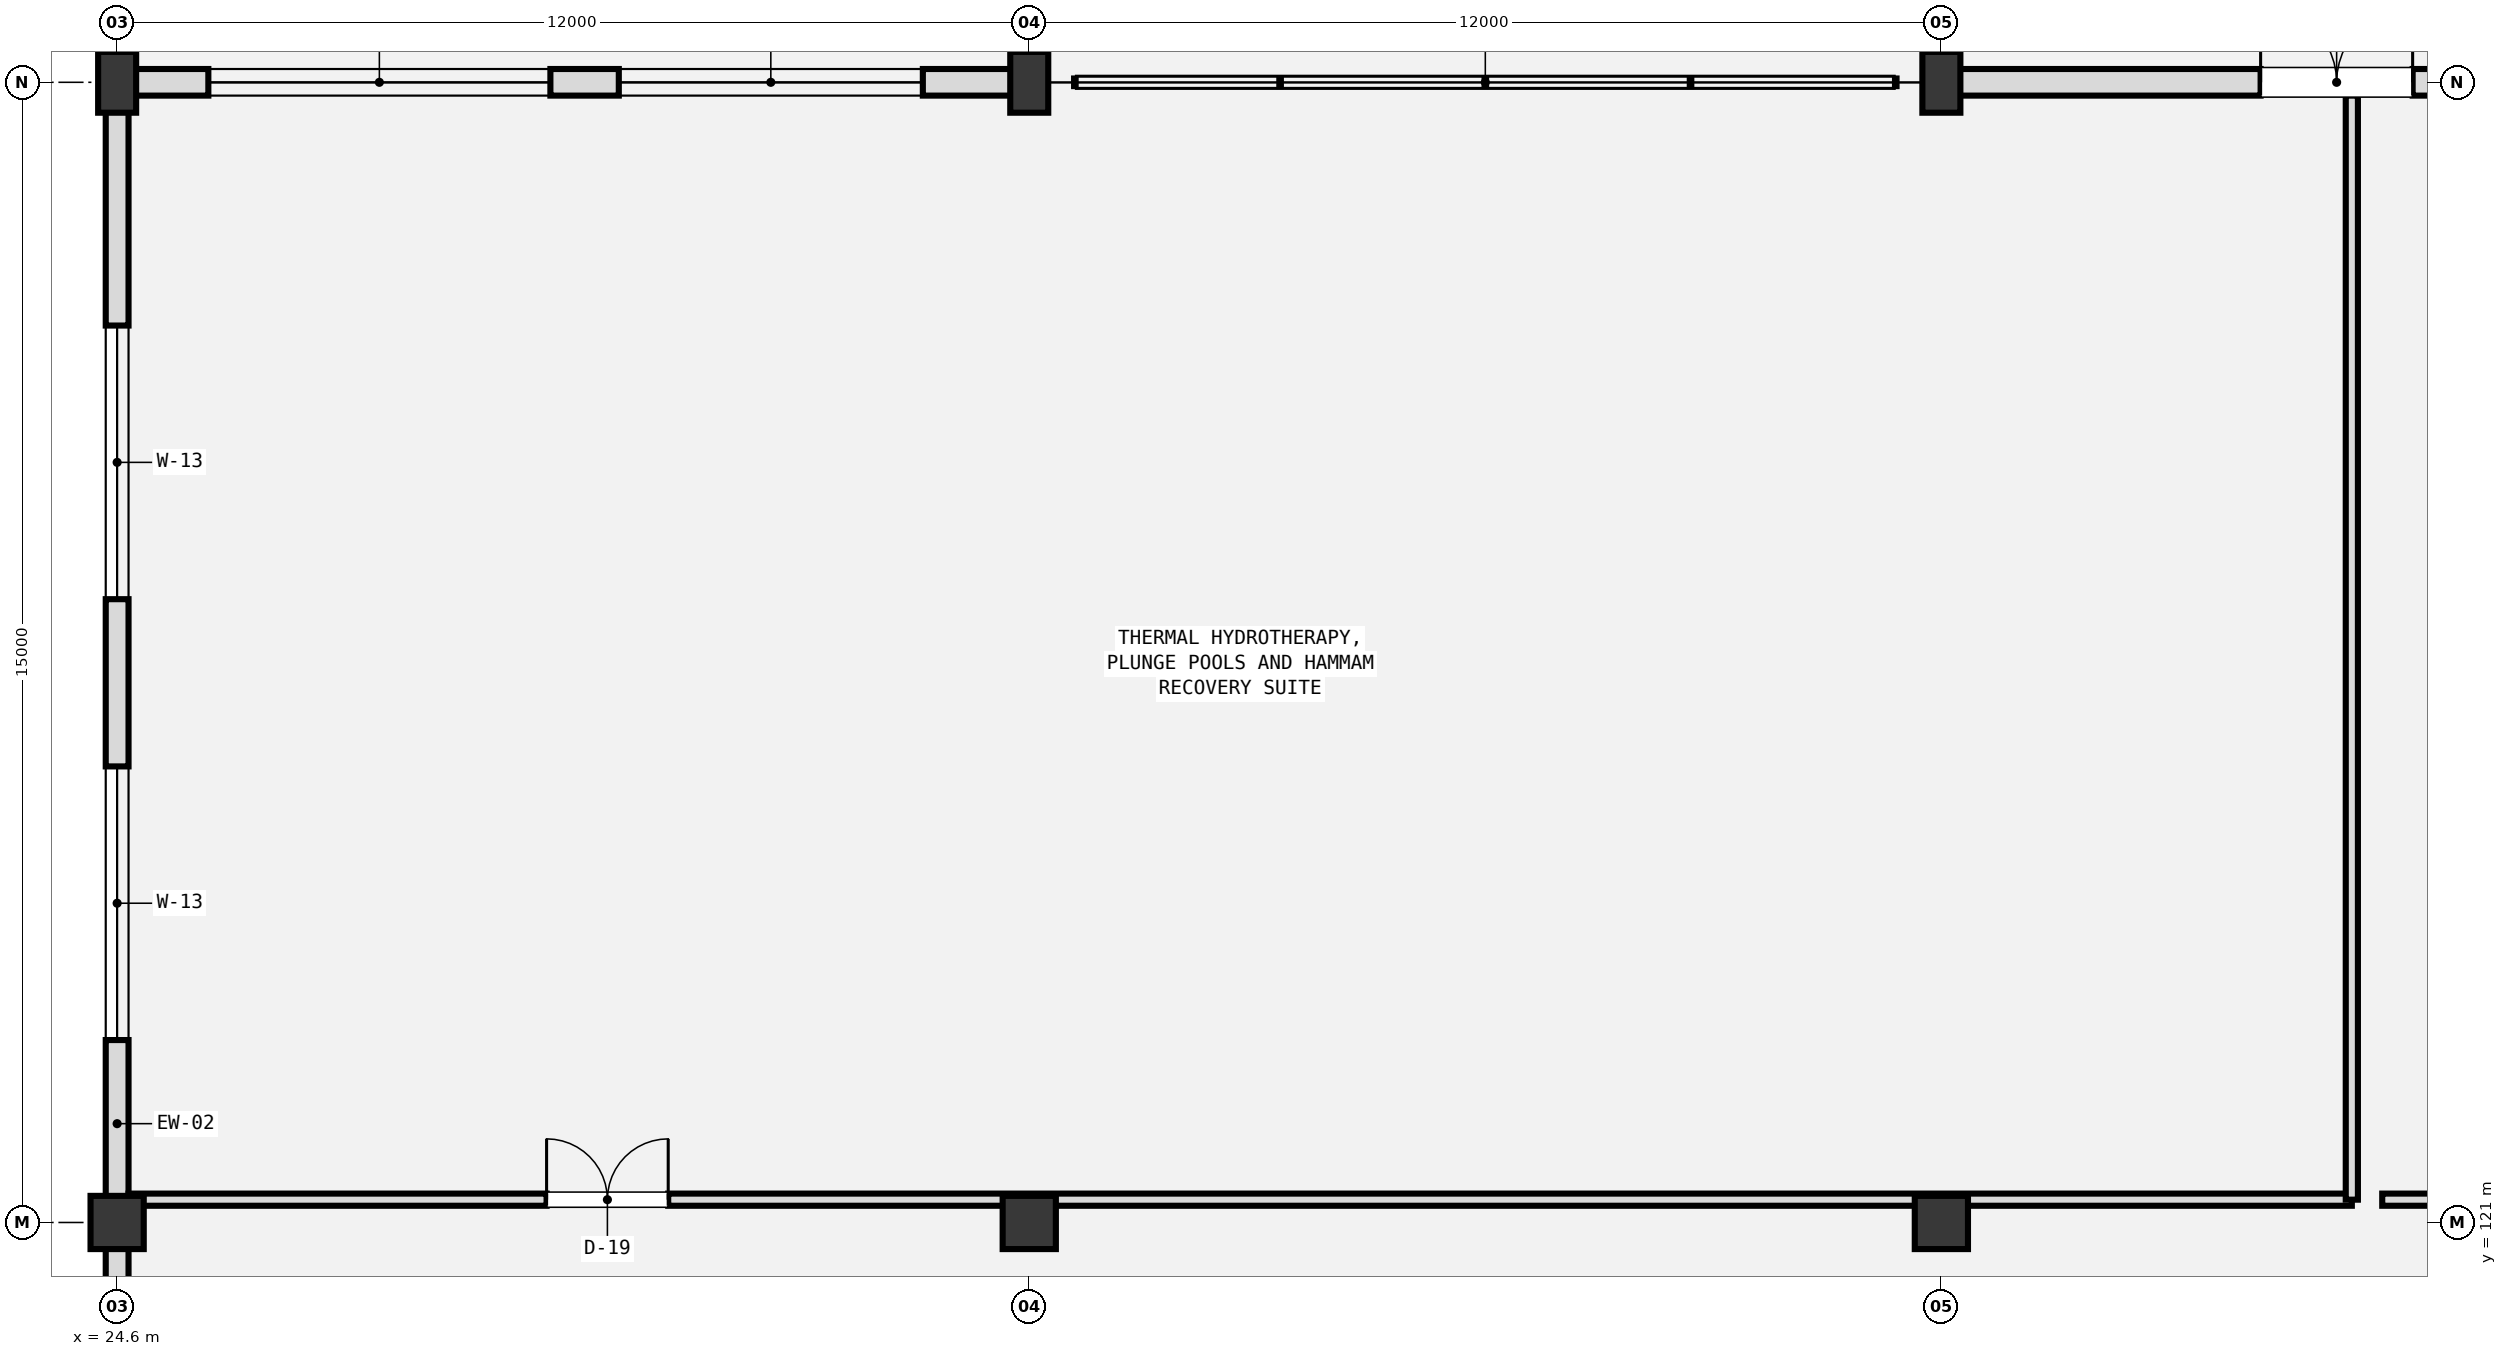
"""IFC4 building model, lengths in metres.
Left out: names, types, materials, properties, quantities, classifications, styles, units other than length and angle.
Written with IfcOpenShell. Run it as: python <this file> out.ifc"""

import sys

from ifc_helpers import new_model, si_unit, direction, frame, frame_2d, origin, origin_2d, place, context, subcontext, project, spatial, rectangle, extrude, element, fill, save


model = new_model("IFC4")
c1 = context("Model", 3, precision=1e-05, world=origin(), true_north=direction((0.0, 1.0)))
c2 = subcontext(c1, "Body", "Model", "MODEL_VIEW")
j1 = project(units=[si_unit("LENGTHUNIT", "METRE"), si_unit("PLANEANGLEUNIT", "RADIAN")], contexts=[c1])
p1 = place(None, origin())
s1 = spatial("IfcSite", under=j1, at=p1, CompositionType="ELEMENT")
p2 = place(p1, origin())
s2 = spatial("IfcBuilding", under=s1, at=p2, CompositionType="ELEMENT")
p3 = place(p2, origin())
s3 = spatial("IfcBuildingStorey", under=s2, at=p3, CompositionType="ELEMENT", Elevation=0.0)
p4 = place(p3, frame((24.6, 121.0, 0.0), z_axis=(0.0, 0.0, 1.0), x_axis=(1.0, 0.0, 0.0)))
e1 = element("IfcColumn", 1, at=p4, inside=s3, PredefinedType="COLUMN", context=c2, shape_type="SweptSolid", body=[
    extrude(rectangle(XDim=0.7, YDim=0.7, at=origin_2d()), origin(), (0.0, 0.0, 1.0), 5.4),
])
p5 = place(p3, frame((24.6, 136.0, 0.0), z_axis=(0.0, 0.0, 1.0), x_axis=(1.0, 0.0, 0.0)))
e2 = element("IfcColumn", 2, at=p5, inside=s3, PredefinedType="COLUMN", context=c2, shape_type="SweptSolid", body=[
    extrude(rectangle(XDim=0.5, YDim=0.8, at=origin_2d()), origin(), (0.0, 0.0, 1.0), 5.4),
])
p6 = place(p3, frame((36.6, 121.0, 0.0), z_axis=(0.0, 0.0, 1.0), x_axis=(1.0, 0.0, 0.0)))
e3 = element("IfcColumn", 3, at=p6, inside=s3, PredefinedType="COLUMN", context=c2, shape_type="SweptSolid", body=[
    extrude(rectangle(XDim=0.7, YDim=0.7, at=origin_2d()), origin(), (0.0, 0.0, 1.0), 5.4),
])
p7 = place(p3, frame((36.6, 136.0, 0.0), z_axis=(0.0, 0.0, 1.0), x_axis=(1.0, 0.0, 0.0)))
e4 = element("IfcColumn", 4, at=p7, inside=s3, PredefinedType="COLUMN", context=c2, shape_type="SweptSolid", body=[
    extrude(rectangle(XDim=0.5, YDim=0.8, at=origin_2d()), origin(), (0.0, 0.0, 1.0), 5.4),
])
p8 = place(p3, frame((48.6, 121.0, 0.0), z_axis=(0.0, 0.0, 1.0), x_axis=(1.0, 0.0, 0.0)))
e5 = element("IfcColumn", 5, at=p8, inside=s3, PredefinedType="COLUMN", context=c2, shape_type="SweptSolid", body=[
    extrude(rectangle(XDim=0.7, YDim=0.7, at=origin_2d()), origin(), (0.0, 0.0, 1.0), 5.4),
])
p9 = place(p3, frame((48.6, 136.0, 0.0), z_axis=(0.0, 0.0, 1.0), x_axis=(1.0, 0.0, 0.0)))
e6 = element("IfcColumn", 6, at=p9, inside=s3, PredefinedType="COLUMN", context=c2, shape_type="SweptSolid", body=[
    extrude(rectangle(XDim=0.5, YDim=0.8, at=origin_2d()), origin(), (0.0, 0.0, 1.0), 5.4),
])
p10 = place(p3, frame((24.6, 136.0, 0.0), z_axis=(0.0, 0.0, 1.0), x_axis=(1.0, 0.0, 0.0)))
e7 = element("IfcWall", 7, at=p10, inside=s3, PredefinedType="SOLIDWALL", context=c2, shape_type="SweptSolid", body=[
    extrude(rectangle(XDim=12.0, YDim=0.35, at=frame_2d((6.0, 0.0))), origin(), (0.0, 0.0, 1.0), 4.53),
])
p11 = place(p10, frame((1.2, 0.0, 0.95)))
e8 = element("IfcOpeningElement", 8, at=p11, cuts=e7, PredefinedType="OPENING", context=c2, shape_type="SweptSolid", body=[
    extrude(rectangle(XDim=4.5, YDim=1.2, at=frame_2d((2.25, 0.6))), frame((0.0, 0.185, 0.0), z_axis=(0.0, -1.0, 0.0), x_axis=(1.0, 0.0, 0.0)), (0.0, 0.0, 1.0), 0.37),
])
p12 = place(p10, frame((6.6, 0.0, 0.95)))
e9 = element("IfcOpeningElement", 9, at=p12, cuts=e7, PredefinedType="OPENING", context=c2, shape_type="SweptSolid", body=[
    extrude(rectangle(XDim=4.0, YDim=1.2, at=frame_2d((2.0, 0.6))), frame((0.0, 0.185, 0.0), z_axis=(0.0, -1.0, 0.0), x_axis=(1.0, 0.0, 0.0)), (0.0, 0.0, 1.0), 0.37),
])
p13 = place(p3, frame((48.6, 136.0, 0.0), z_axis=(0.0, 0.0, 1.0), x_axis=(1.0, 0.0, 0.0)))
e10 = element("IfcWall", 10, at=p13, inside=s3, PredefinedType="SOLIDWALL", context=c2, shape_type="SweptSolid", body=[
    extrude(rectangle(XDim=12.0, YDim=0.35, at=frame_2d((6.0, 0.0))), origin(), (0.0, 0.0, 1.0), 4.79),
])
p14 = place(p13, frame((4.2, 0.0, 0.0)))
e11 = element("IfcOpeningElement", 11, at=p14, cuts=e10, PredefinedType="OPENING", context=c2, shape_type="SweptSolid", body=[
    extrude(rectangle(XDim=2.0, YDim=2.4, at=frame_2d((1.0, 1.2))), frame((0.0, 0.185, 0.0), z_axis=(0.0, -1.0, 0.0), x_axis=(1.0, 0.0, 0.0)), (0.0, 0.0, 1.0), 0.37),
])
p15 = place(p13, frame((6.65, 0.0, 0.95)))
e12 = element("IfcOpeningElement", 12, at=p15, cuts=e10, PredefinedType="OPENING", context=c2, shape_type="SweptSolid", body=[
    extrude(rectangle(XDim=3.6, YDim=1.2, at=frame_2d((1.8, 0.6))), frame((0.0, 0.185, 0.0), z_axis=(0.0, -1.0, 0.0), x_axis=(1.0, 0.0, 0.0)), (0.0, 0.0, 1.0), 0.37),
])
p16 = place(p3, frame((24.6, 108.6, 0.0), z_axis=(0.0, 0.0, 1.0), x_axis=(0.0, 1.0, 0.0)))
e13 = element("IfcWall", 13, at=p16, inside=s3, PredefinedType="SOLIDWALL", context=c2, shape_type="SweptSolid", body=[
    extrude(rectangle(XDim=27.4, YDim=0.3, at=frame_2d((13.7, 0.0))), origin(), (0.0, 0.0, 1.0), 4.48),
])
p17 = place(p16, frame((3.1, 0.0, 0.9)))
e14 = element("IfcOpeningElement", 14, at=p17, cuts=e13, PredefinedType="OPENING", context=c2, shape_type="SweptSolid", body=[
    extrude(rectangle(XDim=3.2, YDim=1.5, at=frame_2d((1.6, 0.75))), frame((0.0, 0.16, 0.0), z_axis=(0.0, -1.0, 0.0), x_axis=(1.0, 0.0, 0.0)), (0.0, 0.0, 1.0), 0.32),
])
p18 = place(p16, frame((14.8, 0.0, 0.9)))
e15 = element("IfcOpeningElement", 15, at=p18, cuts=e13, PredefinedType="OPENING", context=c2, shape_type="SweptSolid", body=[
    extrude(rectangle(XDim=3.6, YDim=1.5, at=frame_2d((1.8, 0.75))), frame((0.0, 0.16, 0.0), z_axis=(0.0, -1.0, 0.0), x_axis=(1.0, 0.0, 0.0)), (0.0, 0.0, 1.0), 0.32),
])
p19 = place(p16, frame((20.6, 0.0, 0.9)))
e16 = element("IfcOpeningElement", 16, at=p19, cuts=e13, PredefinedType="OPENING", context=c2, shape_type="SweptSolid", body=[
    extrude(rectangle(XDim=3.6, YDim=1.5, at=frame_2d((1.8, 0.75))), frame((0.0, 0.16, 0.0), z_axis=(0.0, -1.0, 0.0), x_axis=(1.0, 0.0, 0.0)), (0.0, 0.0, 1.0), 0.32),
])
p20 = place(p3, frame((24.75, 121.3, 0.0), z_axis=(0.0, 0.0, 1.0), x_axis=(1.0, 0.0, 0.0)))
e17 = element("IfcWall", 17, at=p20, inside=s3, PredefinedType="PLUMBINGWALL", context=c2, shape_type="SweptSolid", body=[
    extrude(rectangle(XDim=29.25, YDim=0.16, at=frame_2d((14.625, 0.0))), origin(), (0.0, 0.0, 1.0), 3.9),
])
p21 = place(p20, frame((5.5, 0.0, 0.0)))
e18 = element("IfcOpeningElement", 18, at=p21, cuts=e17, PredefinedType="OPENING", context=c2, shape_type="SweptSolid", body=[
    extrude(rectangle(XDim=1.6, YDim=2.2, at=frame_2d((0.8, 1.1))), frame((0.0, 0.09, 0.0), z_axis=(0.0, -1.0, 0.0), x_axis=(1.0, 0.0, 0.0)), (0.0, 0.0, 1.0), 0.18),
])
p22 = place(p3, frame((54.0, 121.3, 0.0), z_axis=(0.0, 0.0, 1.0), x_axis=(0.0, 1.0, 0.0)))
e19 = element("IfcWall", 19, at=p22, inside=s3, PredefinedType="PLUMBINGWALL", context=c2, shape_type="SweptSolid", body=[
    extrude(rectangle(XDim=14.525, YDim=0.16, at=frame_2d((7.262, 0.0))), origin(), (0.0, 0.0, 1.0), 3.9),
])
p23 = place(p3, frame((54.4, 121.3, 0.0), z_axis=(0.0, 0.0, 1.0), x_axis=(1.0, 0.0, 0.0)))
e20 = element("IfcWall", 20, at=p23, inside=s3, PredefinedType="PLUMBINGWALL", context=c2, shape_type="SweptSolid", body=[
    extrude(rectangle(XDim=27.6, YDim=0.16, at=frame_2d((13.8, 0.0))), origin(), (0.0, 0.0, 1.0), 3.9),
])
p24 = place(p23, frame((10.0, 0.0, 0.0)))
e21 = element("IfcOpeningElement", 21, at=p24, cuts=e20, PredefinedType="OPENING", context=c2, shape_type="SweptSolid", body=[
    extrude(rectangle(XDim=1.6, YDim=2.2, at=frame_2d((0.8, 1.1))), frame((0.0, 0.09, 0.0), z_axis=(0.0, -1.0, 0.0), x_axis=(1.0, 0.0, 0.0)), (0.0, 0.0, 1.0), 0.18),
])
p25 = place(p11, origin())
e22 = element("IfcWindow", 22, at=p25, inside=s3, PartitioningType="TRIPLE_PANEL_HORIZONTAL", PredefinedType="WINDOW", context=c2, shape_type="SweptSolid", body=[
    extrude(rectangle(XDim=4.5, YDim=1.2, at=frame_2d((2.25, 0.6))), frame((0.0, 0.03, 0.0), z_axis=(0.0, -1.0, 0.0), x_axis=(1.0, 0.0, 0.0)), (0.0, 0.0, 1.0), 0.06),
])
fill(e8, e22)
p26 = place(p12, origin())
e23 = element("IfcWindow", 23, at=p26, inside=s3, PartitioningType="TRIPLE_PANEL_HORIZONTAL", PredefinedType="WINDOW", context=c2, shape_type="SweptSolid", body=[
    extrude(rectangle(XDim=4.0, YDim=1.2, at=frame_2d((2.0, 0.6))), frame((0.0, 0.03, 0.0), z_axis=(0.0, -1.0, 0.0), x_axis=(1.0, 0.0, 0.0)), (0.0, 0.0, 1.0), 0.06),
])
fill(e9, e23)
p27 = place(p14, origin())
e24 = element("IfcDoor", 24, at=p27, inside=s3, OperationType="DOUBLE_DOOR_SINGLE_SWING", PredefinedType="DOOR", context=c2, shape_type="SweptSolid", body=[
    extrude(rectangle(XDim=2.0, YDim=2.4, at=frame_2d((1.0, 1.2))), frame((0.0, 0.025, 0.0), z_axis=(0.0, -1.0, 0.0), x_axis=(1.0, 0.0, 0.0)), (0.0, 0.0, 1.0), 0.05),
])
fill(e11, e24)
p28 = place(p18, origin())
e25 = element("IfcWindow", 25, at=p28, inside=s3, PartitioningType="TRIPLE_PANEL_HORIZONTAL", PredefinedType="WINDOW", context=c2, shape_type="SweptSolid", body=[
    extrude(rectangle(XDim=3.6, YDim=1.5, at=frame_2d((1.8, 0.75))), frame((0.0, 0.03, 0.0), z_axis=(0.0, -1.0, 0.0), x_axis=(1.0, 0.0, 0.0)), (0.0, 0.0, 1.0), 0.06),
])
fill(e15, e25)
p29 = place(p19, origin())
e26 = element("IfcWindow", 26, at=p29, inside=s3, PartitioningType="TRIPLE_PANEL_HORIZONTAL", PredefinedType="WINDOW", context=c2, shape_type="SweptSolid", body=[
    extrude(rectangle(XDim=3.6, YDim=1.5, at=frame_2d((1.8, 0.75))), frame((0.0, 0.03, 0.0), z_axis=(0.0, -1.0, 0.0), x_axis=(1.0, 0.0, 0.0)), (0.0, 0.0, 1.0), 0.06),
])
fill(e16, e26)
p30 = place(p21, origin())
e27 = element("IfcDoor", 27, at=p30, inside=s3, OperationType="DOUBLE_DOOR_SINGLE_SWING", PredefinedType="DOOR", context=c2, shape_type="SweptSolid", body=[
    extrude(rectangle(XDim=1.6, YDim=2.2, at=frame_2d((0.8, 1.1))), frame((0.0, 0.025, 0.0), z_axis=(0.0, -1.0, 0.0), x_axis=(1.0, 0.0, 0.0)), (0.0, 0.0, 1.0), 0.05),
])
fill(e18, e27)
save(model, sys.argv[1])
